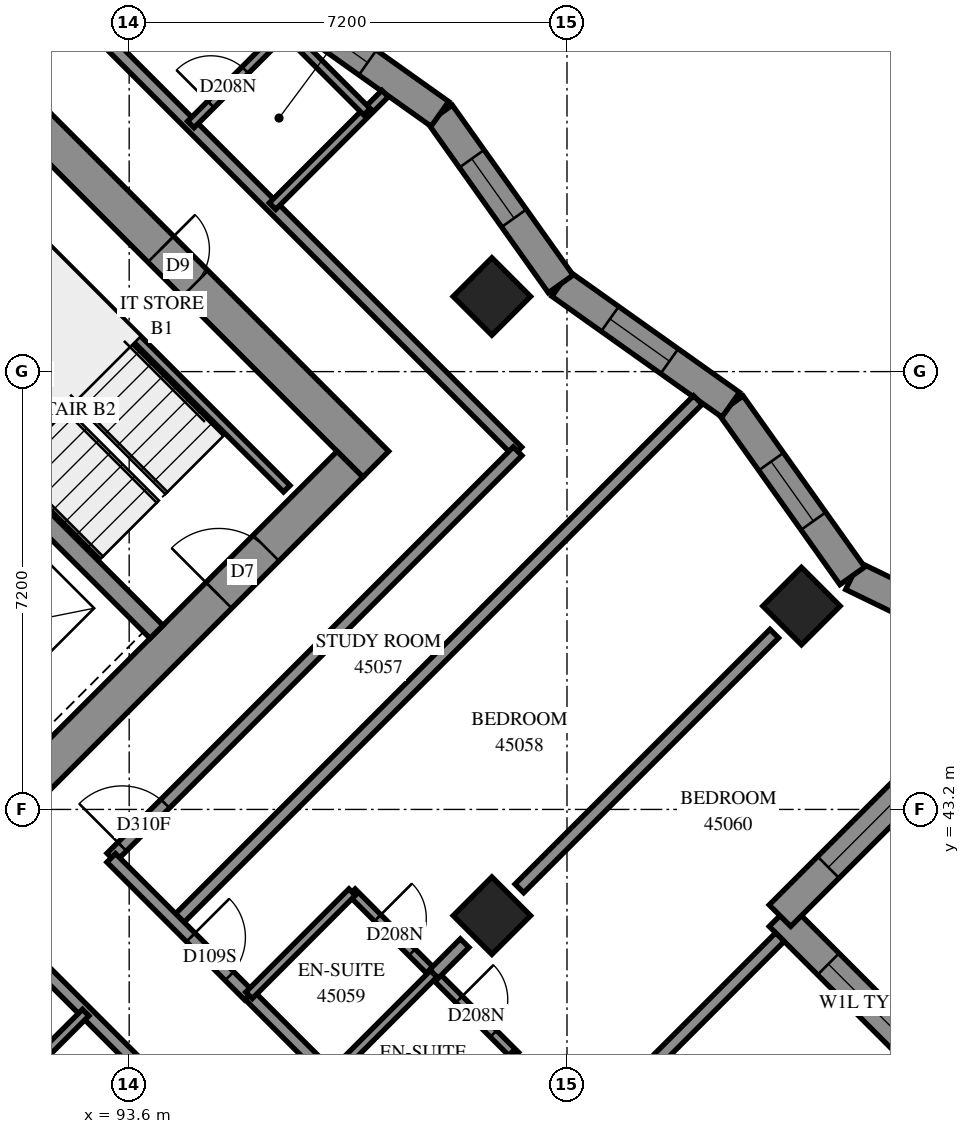
"""IFC4 building model, lengths in metres.
Left out: names, types, materials, properties, quantities, classifications, styles, units other than length and angle.
Written with IfcOpenShell. Run it as: python <this file> out.ifc"""

import sys

from ifc_helpers import new_model, si_unit, direction, frame, frame_2d, origin, origin_2d, place, context, subcontext, project, spatial, polyline, rectangle, outline, extrude, element, fill, save


model = new_model("IFC4")
c1 = context("Model", 3, precision=1e-05, world=origin(), true_north=direction((0.0, 1.0)))
c2 = subcontext(c1, "Body", "Model", "MODEL_VIEW")
j1 = project(units=[si_unit("LENGTHUNIT", "METRE"), si_unit("PLANEANGLEUNIT", "RADIAN")], contexts=[c1])
p1 = place(None, origin())
s1 = spatial("IfcSite", under=j1, at=p1, CompositionType="ELEMENT")
p2 = place(p1, origin())
s2 = spatial("IfcBuilding", under=s1, at=p2, CompositionType="ELEMENT")
p3 = place(p2, frame((0.0, 0.0, 166.0)))
s3 = spatial("IfcBuildingStorey", under=s2, at=p3, CompositionType="ELEMENT", Elevation=166.0)
for number, where, z_axis, x_axis in (
    (1, (99.565, 51.635, 0.0), (0.0, 0.0, 1.0), (0.707, -0.707, 0.0)),
    (2, (104.656, 46.544, 0.0), (0.0, 0.0, 1.0), (0.707, -0.707, 0.0)),
    (3, (99.565, 41.453, 0.0), (0.0, 0.0, 1.0), (0.707, -0.707, 0.0)),
):
    element("IfcColumn", number, at=place(p3, frame(where, z_axis=z_axis, x_axis=x_axis)), inside=s3, PredefinedType="COLUMN", context=c2, shape_type="SweptSolid", body=[
        extrude(rectangle(XDim=0.9, YDim=0.9, at=origin_2d()), origin(), (0.0, 0.0, 1.0), 3.1),
    ])
p4 = place(p3, frame((86.625, 59.908, -0.3), z_axis=(0.0, 0.0, 1.0), x_axis=(0.7071067812, -0.7071067812, 0.0)))
e4 = element("IfcWall", 4, at=p4, inside=s3, PredefinedType="SHEAR", context=c2, shape_type="SweptSolid", body=[
    extrude(rectangle(XDim=15.6, YDim=0.6, at=frame_2d((7.8, 0.0))), origin(), (0.0, 0.0, 1.0), 2.7),
])
p5 = place(p4, frame((10.6, 0.0, 0.3)))
e5 = element("IfcOpeningElement", 5, at=p5, cuts=e4, PredefinedType="OPENING", context=c2, shape_type="SweptSolid", body=[
    extrude(rectangle(XDim=0.8, YDim=2.1, at=frame_2d((0.4, 1.05))), frame((0.0, 0.31, 0.0), z_axis=(0.0, -1.0, 0.0), x_axis=(1.0, 0.0, 0.0)), (0.0, 0.0, 1.0), 0.62),
])
p6 = place(p3, frame((87.049, 38.695, -0.3), z_axis=(0.0, 0.0, 1.0), x_axis=(0.7071067812, 0.7071067812, 0.0)))
e6 = element("IfcWall", 6, at=p6, inside=s3, PredefinedType="SHEAR", context=c2, shape_type="SweptSolid", body=[
    extrude(rectangle(XDim=14.4, YDim=0.6, at=frame_2d((7.2, 0.0))), origin(), (0.0, 0.0, 1.0), 2.7),
])
p7 = place(p6, frame((4.55, 0.0, 0.3)))
e7 = element("IfcOpeningElement", 7, at=p7, cuts=e6, PredefinedType="OPENING", context=c2, shape_type="SweptSolid", body=[
    extrude(rectangle(XDim=1.1, YDim=2.1, at=frame_2d((0.55, 1.05))), frame((0.0, 0.31, 0.0), z_axis=(0.0, -1.0, 0.0), x_axis=(1.0, 0.0, 0.0)), (0.0, 0.0, 1.0), 0.62),
])
p8 = place(p6, frame((11.35, 0.0, 0.3)))
e8 = element("IfcOpeningElement", 8, at=p8, cuts=e6, PredefinedType="OPENING", context=c2, shape_type="SweptSolid", body=[
    extrude(rectangle(XDim=1.1, YDim=2.1, at=frame_2d((0.55, 1.05))), frame((0.0, 0.31, 0.0), z_axis=(0.0, -1.0, 0.0), x_axis=(1.0, 0.0, 0.0)), (0.0, 0.0, 1.0), 0.62),
])
p9 = place(p3, frame((88.958, 51.211, 0.0), z_axis=(0.0, 0.0, 1.0), x_axis=(0.7070998367, -0.7071137256, 0.0)))
e9 = element("IfcWall", 9, at=p9, inside=s3, PredefinedType="SOLIDWALL", context=c2, shape_type="SweptSolid", body=[
    extrude(rectangle(XDim=7.2, YDim=0.3, at=frame_2d((3.6, 0.0))), origin(), (0.0, 0.0, 1.0), 3.1),
])
p10 = place(p3, frame((107.761, 37.994, 0.0), z_axis=(0.0, 0.0, 1.0), x_axis=(-0.7071170028, 0.7070965594, 0.0)))
e10 = element("IfcWall", 10, at=p10, inside=s3, PredefinedType="SOLIDWALL", context=c2, shape_type="SweptSolid", body=[
    extrude(outline(polyline([(-0.159, -0.25), (4.641, -0.25), (5.141, 0.25), (0.159, 0.25), (-0.159, -0.25)])), origin(), (0.0, 0.0, 1.0), 3.1),
])
p11 = place(p10, frame((1.966, 0.0, 0.6)))
e11 = element("IfcOpeningElement", 11, at=p11, cuts=e10, PredefinedType="OPENING", context=c2, shape_type="SweptSolid", body=[
    extrude(rectangle(XDim=1.8, YDim=1.9, at=frame_2d((0.9, 0.95))), frame((0.0, 0.26, 0.0), z_axis=(0.0, -1.0, 0.0), x_axis=(1.0, 0.0, 0.0)), (0.0, 0.0, 1.0), 0.52),
])
p12 = place(p3, frame((104.302, 41.453, 0.0), z_axis=(0.0, 0.0, 1.0), x_axis=(0.7071238144, 0.7070897476, 0.0)))
e12 = element("IfcWall", 12, at=p12, inside=s3, PredefinedType="SOLIDWALL", context=c2, shape_type="SweptSolid", body=[
    extrude(outline(polyline([(0.25, -0.25), (6.222, -0.25), (5.52, 0.25), (-0.25, 0.25), (0.25, -0.25)])), origin(), (0.0, 0.0, 1.0), 3.1),
])
p13 = place(p12, frame((1.125, 0.0, 0.6)))
e13 = element("IfcOpeningElement", 13, at=p13, cuts=e12, PredefinedType="OPENING", context=c2, shape_type="SweptSolid", body=[
    extrude(rectangle(XDim=1.8, YDim=1.9, at=frame_2d((0.9, 0.95))), frame((0.0, 0.26, 0.0), z_axis=(0.0, -1.0, 0.0), x_axis=(1.0, 0.0, 0.0)), (0.0, 0.0, 1.0), 0.52),
])
p14 = place(p12, frame((3.985, 0.0, 0.6)))
e14 = element("IfcOpeningElement", 14, at=p14, cuts=e12, PredefinedType="OPENING", context=c2, shape_type="SweptSolid", body=[
    extrude(rectangle(XDim=1.2, YDim=1.9, at=frame_2d((0.6, 0.95))), frame((0.0, 0.26, 0.0), z_axis=(0.0, -1.0, 0.0), x_axis=(1.0, 0.0, 0.0)), (0.0, 0.0, 1.0), 0.52),
])
p15 = place(p3, frame((108.454, 45.604, 0.0), z_axis=(0.0, 0.0, 1.0), x_axis=(-0.8996561364, 0.4365991711, 0.0)))
e15 = element("IfcWall", 15, at=p15, inside=s3, PredefinedType="SOLIDWALL", context=c2, shape_type="SweptSolid", body=[
    extrude(outline(polyline([(-0.351, -0.25), (3.228, -0.25), (3.356, 0.25), (0.351, 0.25), (-0.351, -0.25)])), origin(), (0.0, 0.0, 1.0), 3.1),
])
p16 = place(p15, frame((1.222, 0.0, 0.45)))
e16 = element("IfcOpeningElement", 16, at=p16, cuts=e15, PredefinedType="OPENING", context=c2, shape_type="SweptSolid", body=[
    extrude(rectangle(XDim=1.2, YDim=2.5, at=frame_2d((0.6, 1.25))), frame((0.0, 0.26, 0.0), z_axis=(0.0, -1.0, 0.0), x_axis=(1.0, 0.0, 0.0)), (0.0, 0.0, 1.0), 0.52),
])
p17 = place(p3, frame((105.492, 47.041, 0.0), z_axis=(0.0, 0.0, 1.0), x_axis=(-0.5792714747, 0.8151346874, 0.0)))
e17 = element("IfcWall", 17, at=p17, inside=s3, PredefinedType="SOLIDWALL", context=c2, shape_type="SweptSolid", body=[
    extrude(outline(polyline([(0.064, -0.25), (3.494, -0.25), (3.409, 0.25), (-0.064, 0.25), (0.064, -0.25)])), origin(), (0.0, 0.0, 1.0), 3.1),
])
p18 = place(p17, frame((1.105, 0.0, 0.45)))
e18 = element("IfcOpeningElement", 18, at=p18, cuts=e17, PredefinedType="OPENING", context=c2, shape_type="SweptSolid", body=[
    extrude(rectangle(XDim=1.2, YDim=2.5, at=frame_2d((0.6, 1.25))), frame((0.0, 0.26, 0.0), z_axis=(0.0, -1.0, 0.0), x_axis=(1.0, 0.0, 0.0)), (0.0, 0.0, 1.0), 0.52),
])
p19 = place(p3, frame((103.493, 49.855, 0.0), z_axis=(0.0, 0.0, 1.0), x_axis=(-0.8151376585, 0.5792672938, 0.0)))
e19 = element("IfcWall", 19, at=p19, inside=s3, PredefinedType="SOLIDWALL", context=c2, shape_type="SweptSolid", body=[
    extrude(outline(polyline([(-0.042, -0.25), (3.388, -0.25), (3.472, 0.25), (0.042, 0.25), (-0.042, -0.25)])), origin(), (0.0, 0.0, 1.0), 3.1),
])
p20 = place(p19, frame((1.236, 0.0, 0.45)))
e20 = element("IfcOpeningElement", 20, at=p20, cuts=e19, PredefinedType="OPENING", context=c2, shape_type="SweptSolid", body=[
    extrude(rectangle(XDim=1.2, YDim=2.5, at=frame_2d((0.6, 1.25))), frame((0.0, 0.26, 0.0), z_axis=(0.0, -1.0, 0.0), x_axis=(1.0, 0.0, 0.0)), (0.0, 0.0, 1.0), 0.52),
])
p21 = place(p3, frame((100.697, 51.842, 0.0), z_axis=(0.0, 0.0, 1.0), x_axis=(-0.5792728992, 0.8151336751, 0.0)))
e21 = element("IfcWall", 21, at=p21, inside=s3, PredefinedType="SOLIDWALL", context=c2, shape_type="SweptSolid", body=[
    extrude(outline(polyline([(0.042, -0.25), (3.472, -0.25), (3.388, 0.25), (-0.042, 0.25), (0.042, -0.25)])), origin(), (0.0, 0.0, 1.0), 3.1),
])
p22 = place(p21, frame((1.326, 0.0, 0.45)))
e22 = element("IfcOpeningElement", 22, at=p22, cuts=e21, PredefinedType="OPENING", context=c2, shape_type="SweptSolid", body=[
    extrude(rectangle(XDim=1.2, YDim=2.5, at=frame_2d((0.6, 1.25))), frame((0.0, 0.26, 0.0), z_axis=(0.0, -1.0, 0.0), x_axis=(1.0, 0.0, 0.0)), (0.0, 0.0, 1.0), 0.52),
])
p23 = place(p3, frame((98.71, 54.638, 0.0), z_axis=(0.0, 0.0, 1.0), x_axis=(-0.8151376585, 0.5792672938, 0.0)))
e23 = element("IfcWall", 23, at=p23, inside=s3, PredefinedType="SOLIDWALL", context=c2, shape_type="SweptSolid", body=[
    extrude(outline(polyline([(-0.042, -0.25), (3.388, -0.25), (3.472, 0.25), (0.042, 0.25), (-0.042, -0.25)])), origin(), (0.0, 0.0, 1.0), 3.1),
])
p24 = place(p23, frame((1.457, 0.0, 0.45)))
e24 = element("IfcOpeningElement", 24, at=p24, cuts=e23, PredefinedType="OPENING", context=c2, shape_type="SweptSolid", body=[
    extrude(rectangle(XDim=1.2, YDim=2.5, at=frame_2d((0.6, 1.25))), frame((0.0, 0.26, 0.0), z_axis=(0.0, -1.0, 0.0), x_axis=(1.0, 0.0, 0.0)), (0.0, 0.0, 1.0), 0.52),
])
p25 = place(p3, frame((91.313, 53.354, 0.0), z_axis=(0.0, 0.0, 1.0), x_axis=(0.7071140275, -0.7070995348, 0.0)))
e25 = element("IfcWall", 25, at=p25, inside=s3, PredefinedType="PARTITIONING", context=c2, shape_type="SweptSolid", body=[
    extrude(rectangle(XDim=6.9, YDim=0.15, at=frame_2d((3.45, 0.0))), origin(), (0.0, 0.0, 1.0), 3.1),
])
p26 = place(p3, frame((91.967, 40.785, 0.0), z_axis=(0.0, 0.0, 1.0), x_axis=(0.7071067812, -0.7071067812, 0.0)))
e26 = element("IfcWall", 26, at=p26, inside=s3, PredefinedType="PARTITIONING", context=c2, shape_type="SweptSolid", body=[
    extrude(rectangle(XDim=12.1, YDim=0.2, at=frame_2d((6.05, 0.0))), origin(), (0.0, 0.0, 1.0), 3.1),
])
p27 = place(p26, frame((3.448, 0.0, 0.0)))
e27 = element("IfcOpeningElement", 27, at=p27, cuts=e26, PredefinedType="OPENING", context=c2, shape_type="SweptSolid", body=[
    extrude(rectangle(XDim=0.9, YDim=2.1, at=frame_2d((0.45, 1.05))), frame((0.0, 0.11, 0.0), z_axis=(0.0, -1.0, 0.0), x_axis=(1.0, 0.0, 0.0)), (0.0, 0.0, 1.0), 0.22),
])
p28 = place(p26, frame((8.457, 0.0, 0.0)))
e28 = element("IfcOpeningElement", 28, at=p28, cuts=e26, PredefinedType="OPENING", context=c2, shape_type="SweptSolid", body=[
    extrude(rectangle(XDim=1.0, YDim=2.1, at=frame_2d((0.5, 1.05))), frame((0.0, 0.11, 0.0), z_axis=(0.0, -1.0, 0.0), x_axis=(1.0, 0.0, 0.0)), (0.0, 0.0, 1.0), 0.22),
])
p29 = place(p3, frame((94.366, 41.348, 0.0), z_axis=(0.0, 0.0, 1.0), x_axis=(0.7071108994, 0.707102663, 0.0)))
e29 = element("IfcWall", 29, at=p29, inside=s3, PredefinedType="PARTITIONING", context=c2, shape_type="SweptSolid", body=[
    extrude(rectangle(XDim=12.141, YDim=0.2, at=frame_2d((6.071, 0.0))), origin(), (0.0, 0.0, 1.0), 3.1),
])
p30 = place(p3, frame((91.755, 57.317, 0.0), z_axis=(0.0, 0.0, 1.0), x_axis=(0.7071067812, -0.7071067812, 0.0)))
e30 = element("IfcWall", 30, at=p30, inside=s3, PredefinedType="PARTITIONING", context=c2, shape_type="SweptSolid", body=[
    extrude(rectangle(XDim=11.639, YDim=0.2, at=frame_2d((5.819, 0.0))), origin(), (0.0, 0.0, 1.0), 3.1),
])
p31 = place(p3, frame((93.306, 42.408, 0.0), z_axis=(0.0, 0.0, 1.0), x_axis=(0.7071067812, 0.7071067812, 0.0)))
e31 = element("IfcWall", 31, at=p31, inside=s3, PredefinedType="PARTITIONING", context=c2, shape_type="SweptSolid", body=[
    extrude(rectangle(XDim=9.45, YDim=0.2, at=frame_2d((4.725, 0.0))), origin(), (0.0, 0.0, 1.0), 3.1),
])
p32 = place(p31, frame((0.253, 0.0, 0.0)))
e32 = element("IfcOpeningElement", 32, at=p32, cuts=e31, PredefinedType="OPENING", context=c2, shape_type="SweptSolid", body=[
    extrude(rectangle(XDim=1.0, YDim=2.1, at=frame_2d((0.5, 1.05))), frame((0.0, 0.11, 0.0), z_axis=(0.0, -1.0, 0.0), x_axis=(1.0, 0.0, 0.0)), (0.0, 0.0, 1.0), 0.22),
])
p33 = place(p3, frame((99.458, 36.256, 0.0), z_axis=(0.0, 0.0, 1.0), x_axis=(0.7071067812, 0.7071067812, 0.0)))
e33 = element("IfcWall", 33, at=p33, inside=s3, PredefinedType="PARTITIONING", context=c2, shape_type="SweptSolid", body=[
    extrude(rectangle(XDim=6.85, YDim=0.2, at=frame_2d((3.425, 0.0))), origin(), (0.0, 0.0, 1.0), 3.1),
])
p34 = place(p3, frame((100.017, 41.901, 0.0), z_axis=(0.0, 0.0, 1.0), x_axis=(0.7072754814, 0.7069380408, 0.0)))
e34 = element("IfcWall", 34, at=p34, inside=s3, PredefinedType="PARTITIONING", context=c2, shape_type="SweptSolid", body=[
    extrude(rectangle(XDim=5.927, YDim=0.2, at=frame_2d((2.963, 0.0))), origin(), (0.0, 0.0, 1.0), 3.1),
])
p35 = place(p3, frame((97.263, 41.839, 0.0), z_axis=(0.0, 0.0, 1.0), x_axis=(0.7071067812, -0.7071067812, 0.0)))
e35 = element("IfcWall", 35, at=p35, inside=s3, PredefinedType="PARTITIONING", context=c2, shape_type="SweptSolid", body=[
    extrude(rectangle(XDim=3.801, YDim=0.15, at=frame_2d((1.901, 0.0))), origin(), (0.0, 0.0, 1.0), 3.1),
])
p36 = place(p35, frame((0.598, 0.0, 0.0)))
e36 = element("IfcOpeningElement", 36, at=p36, cuts=e35, PredefinedType="OPENING", context=c2, shape_type="SweptSolid", body=[
    extrude(rectangle(XDim=0.8, YDim=2.1, at=frame_2d((0.4, 1.05))), frame((0.0, 0.085, 0.0), z_axis=(0.0, -1.0, 0.0), x_axis=(1.0, 0.0, 0.0)), (0.0, 0.0, 1.0), 0.17),
])
p37 = place(p35, frame((2.493, 0.0, 0.0)))
e37 = element("IfcOpeningElement", 37, at=p37, cuts=e35, PredefinedType="OPENING", context=c2, shape_type="SweptSolid", body=[
    extrude(rectangle(XDim=0.8, YDim=2.1, at=frame_2d((0.4, 1.05))), frame((0.0, 0.085, 0.0), z_axis=(0.0, -1.0, 0.0), x_axis=(1.0, 0.0, 0.0)), (0.0, 0.0, 1.0), 0.17),
])
p38 = place(p3, frame((95.573, 40.148, 0.0), z_axis=(0.0, 0.0, 1.0), x_axis=(0.7068698107, -0.7073436723, 0.0)))
e38 = element("IfcWall", 38, at=p38, inside=s3, PredefinedType="PARTITIONING", context=c2, shape_type="SweptSolid", body=[
    extrude(rectangle(XDim=3.799, YDim=0.2, at=frame_2d((1.899, 0.0))), origin(), (0.0, 0.0, 1.0), 3.1),
])
p39 = place(p3, frame((93.305, 42.403, 0.0), z_axis=(0.0, 0.0, 1.0), x_axis=(0.7071067812, -0.7071067812, 0.0)))
e39 = element("IfcWall", 39, at=p39, inside=s3, PredefinedType="PARTITIONING", context=c2, shape_type="SweptSolid", body=[
    extrude(rectangle(XDim=3.199, YDim=0.2, at=frame_2d((1.599, 0.0))), origin(), (0.0, 0.0, 1.0), 3.1),
])
p40 = place(p39, frame((1.848, 0.0, 0.0)))
e40 = element("IfcOpeningElement", 40, at=p40, cuts=e39, PredefinedType="OPENING", context=c2, shape_type="SweptSolid", body=[
    extrude(rectangle(XDim=0.9, YDim=2.1, at=frame_2d((0.45, 1.05))), frame((0.0, 0.11, 0.0), z_axis=(0.0, -1.0, 0.0), x_axis=(1.0, 0.0, 0.0)), (0.0, 0.0, 1.0), 0.22),
])
p41 = place(p3, frame((95.957, 53.121, 0.0), z_axis=(0.0, 0.0, 1.0), x_axis=(0.7070876797, 0.7071258821, 0.0)))
e41 = element("IfcWall", 41, at=p41, inside=s3, PredefinedType="PARTITIONING", context=c2, shape_type="SweptSolid", body=[
    extrude(rectangle(XDim=2.618, YDim=0.15, at=frame_2d((1.309, 0.0))), origin(), (0.0, 0.0, 1.0), 3.1),
])
p42 = place(p3, frame((95.782, 56.401, 0.0), z_axis=(0.0, 0.0, 1.0), x_axis=(0.707127237, -0.7070863248, 0.0)))
e42 = element("IfcWall", 42, at=p42, inside=s3, PredefinedType="PARTITIONING", context=c2, shape_type="SweptSolid", body=[
    extrude(rectangle(XDim=2.444, YDim=0.15, at=frame_2d((1.222, 0.0))), origin(), (0.0, 0.0, 1.0), 3.1),
])
for number, where, z_axis, x_axis in (
    (43, (95.571, 40.143, 0.0), (0.0, 0.0, 1.0), (0.707, 0.708, 0.0)),
    (44, (98.253, 37.461, 0.0), (0.0, 0.0, 1.0), (0.708, 0.707, 0.0)),
    (45, (91.189, 38.161, 0.0), (0.0, 0.0, 1.0), (0.707, 0.708, 0.0)),
):
    element("IfcWall", number, at=place(p3, frame(where, z_axis=z_axis, x_axis=x_axis)), inside=s3, PredefinedType="PARTITIONING", context=c2, shape_type="SweptSolid", body=[
        extrude(rectangle(XDim=2.4, YDim=0.15, at=frame_2d((1.2, 0.0))), origin(), (0.0, 0.0, 1.0), 3.1),
    ])
p43 = place(p3, frame((96.913, 38.803, 0.0), z_axis=(0.0, 0.0, 1.0), x_axis=(0.7071067812, 0.7071067812, 0.0)))
e46 = element("IfcWall", 46, at=p43, inside=s3, PredefinedType="PARTITIONING", context=c2, shape_type="SweptSolid", body=[
    extrude(rectangle(XDim=2.398, YDim=0.15, at=frame_2d((1.199, 0.0))), origin(), (0.0, 0.0, 1.0), 3.1),
])
p44 = place(p3, frame((94.614, 54.464, 0.0), z_axis=(0.0, 0.0, 1.0), x_axis=(0.7071067812, 0.7071067812, 0.0)))
e47 = element("IfcWall", 47, at=p44, inside=s3, PredefinedType="PARTITIONING", context=c2, shape_type="SweptSolid", body=[
    extrude(rectangle(XDim=2.296, YDim=0.15, at=frame_2d((1.148, 0.0))), origin(), (0.0, 0.0, 1.0), 3.1),
])
p45 = place(p44, frame((0.466, 0.0, 0.0)))
e48 = element("IfcOpeningElement", 48, at=p45, cuts=e47, PredefinedType="OPENING", context=c2, shape_type="SweptSolid", body=[
    extrude(rectangle(XDim=0.8, YDim=2.1, at=frame_2d((0.4, 1.05))), frame((0.0, 0.085, 0.0), z_axis=(0.0, -1.0, 0.0), x_axis=(1.0, 0.0, 0.0)), (0.0, 0.0, 1.0), 0.17),
])
p46 = place(p3, frame((98.613, 40.495, 0.0), z_axis=(0.0, 0.0, 1.0), x_axis=(0.7057051861, 0.7085056035, 0.0)))
e49 = element("IfcWall", 49, at=p46, inside=s3, PredefinedType="PARTITIONING", context=c2, shape_type="SweptSolid", body=[
    extrude(rectangle(XDim=0.714, YDim=0.2, at=frame_2d((0.357, 0.0))), origin(), (0.0, 0.0, 1.0), 3.1),
])
p47 = place(p11, origin())
e50 = element("IfcWindow", 50, at=p47, inside=s3, PartitioningType="SINGLE_PANEL", PredefinedType="WINDOW", context=c2, shape_type="SweptSolid", body=[
    extrude(rectangle(XDim=1.8, YDim=1.9, at=frame_2d((0.9, 0.95))), frame((0.0, 0.18, 0.0), z_axis=(0.0, -1.0, 0.0), x_axis=(1.0, 0.0, 0.0)), (0.0, 0.0, 1.0), 0.06),
])
fill(e11, e50)
p48 = place(p13, origin())
e51 = element("IfcWindow", 51, at=p48, inside=s3, PartitioningType="SINGLE_PANEL", PredefinedType="WINDOW", context=c2, shape_type="SweptSolid", body=[
    extrude(rectangle(XDim=1.8, YDim=1.9, at=frame_2d((0.9, 0.95))), frame((0.0, 0.18, 0.0), z_axis=(0.0, -1.0, 0.0), x_axis=(1.0, 0.0, 0.0)), (0.0, 0.0, 1.0), 0.06),
])
fill(e13, e51)
p49 = place(p18, origin())
e52 = element("IfcWindow", 52, at=p49, inside=s3, PartitioningType="SINGLE_PANEL", PredefinedType="WINDOW", context=c2, shape_type="SweptSolid", body=[
    extrude(rectangle(XDim=1.2, YDim=2.5, at=frame_2d((0.6, 1.25))), frame((0.0, 0.18, 0.0), z_axis=(0.0, -1.0, 0.0), x_axis=(1.0, 0.0, 0.0)), (0.0, 0.0, 1.0), 0.06),
])
fill(e18, e52)
p50 = place(p20, origin())
e53 = element("IfcWindow", 53, at=p50, inside=s3, PartitioningType="SINGLE_PANEL", PredefinedType="WINDOW", context=c2, shape_type="SweptSolid", body=[
    extrude(rectangle(XDim=1.2, YDim=2.5, at=frame_2d((0.6, 1.25))), frame((0.0, 0.18, 0.0), z_axis=(0.0, -1.0, 0.0), x_axis=(1.0, 0.0, 0.0)), (0.0, 0.0, 1.0), 0.06),
])
fill(e20, e53)
p51 = place(p22, origin())
e54 = element("IfcWindow", 54, at=p51, inside=s3, PartitioningType="SINGLE_PANEL", PredefinedType="WINDOW", context=c2, shape_type="SweptSolid", body=[
    extrude(rectangle(XDim=1.2, YDim=2.5, at=frame_2d((0.6, 1.25))), frame((0.0, 0.18, 0.0), z_axis=(0.0, -1.0, 0.0), x_axis=(1.0, 0.0, 0.0)), (0.0, 0.0, 1.0), 0.06),
])
fill(e22, e54)
p52 = place(p24, origin())
e55 = element("IfcWindow", 55, at=p52, inside=s3, PartitioningType="SINGLE_PANEL", PredefinedType="WINDOW", context=c2, shape_type="SweptSolid", body=[
    extrude(rectangle(XDim=1.2, YDim=2.5, at=frame_2d((0.6, 1.25))), frame((0.0, 0.18, 0.0), z_axis=(0.0, -1.0, 0.0), x_axis=(1.0, 0.0, 0.0)), (0.0, 0.0, 1.0), 0.06),
])
fill(e24, e55)
p53 = place(p5, origin())
e56 = element("IfcDoor", 56, at=p53, inside=s3, OperationType="SINGLE_SWING_RIGHT", PredefinedType="DOOR", context=c2, shape_type="SweptSolid", body=[
    extrude(rectangle(XDim=0.8, YDim=2.1, at=frame_2d((0.4, 1.05))), frame((0.0, 0.025, 0.0), z_axis=(0.0, -1.0, 0.0), x_axis=(1.0, 0.0, 0.0)), (0.0, 0.0, 1.0), 0.05),
])
fill(e5, e56)
p54 = place(p8, origin())
e57 = element("IfcDoor", 57, at=p54, inside=s3, OperationType="SINGLE_SWING_RIGHT", PredefinedType="DOOR", context=c2, shape_type="SweptSolid", body=[
    extrude(rectangle(XDim=1.1, YDim=2.1, at=frame_2d((0.55, 1.05))), frame((0.0, 0.025, 0.0), z_axis=(0.0, -1.0, 0.0), x_axis=(1.0, 0.0, 0.0)), (0.0, 0.0, 1.0), 0.05),
])
fill(e8, e57)
p55 = place(p32, origin())
e58 = element("IfcDoor", 58, at=p55, inside=s3, OperationType="SINGLE_SWING_RIGHT", PredefinedType="DOOR", context=c2, shape_type="SweptSolid", body=[
    extrude(rectangle(XDim=1.0, YDim=2.1, at=frame_2d((0.5, 1.05))), frame((0.0, 0.025, 0.0), z_axis=(0.0, -1.0, 0.0), x_axis=(1.0, 0.0, 0.0)), (0.0, 0.0, 1.0), 0.05),
])
fill(e32, e58)
p56 = place(p40, origin())
e59 = element("IfcDoor", 59, at=p56, inside=s3, OperationType="SINGLE_SWING_RIGHT", PredefinedType="DOOR", context=c2, shape_type="SweptSolid", body=[
    extrude(rectangle(XDim=0.9, YDim=2.1, at=frame_2d((0.45, 1.05))), frame((0.0, 0.025, 0.0), z_axis=(0.0, -1.0, 0.0), x_axis=(1.0, 0.0, 0.0)), (0.0, 0.0, 1.0), 0.05),
])
fill(e40, e59)
p57 = place(p36, origin())
e60 = element("IfcDoor", 60, at=p57, inside=s3, OperationType="SINGLE_SWING_RIGHT", PredefinedType="DOOR", context=c2, shape_type="SweptSolid", body=[
    extrude(rectangle(XDim=0.8, YDim=2.1, at=frame_2d((0.4, 1.05))), frame((0.0, 0.025, 0.0), z_axis=(0.0, -1.0, 0.0), x_axis=(1.0, 0.0, 0.0)), (0.0, 0.0, 1.0), 0.05),
])
fill(e36, e60)
p58 = place(p37, origin())
e61 = element("IfcDoor", 61, at=p58, inside=s3, OperationType="SINGLE_SWING_RIGHT", PredefinedType="DOOR", context=c2, shape_type="SweptSolid", body=[
    extrude(rectangle(XDim=0.8, YDim=2.1, at=frame_2d((0.4, 1.05))), frame((0.0, 0.025, 0.0), z_axis=(0.0, -1.0, 0.0), x_axis=(1.0, 0.0, 0.0)), (0.0, 0.0, 1.0), 0.05),
])
fill(e37, e61)
p59 = place(p45, origin())
e62 = element("IfcDoor", 62, at=p59, inside=s3, OperationType="SINGLE_SWING_RIGHT", PredefinedType="DOOR", context=c2, shape_type="SweptSolid", body=[
    extrude(rectangle(XDim=0.8, YDim=2.1, at=frame_2d((0.4, 1.05))), frame((0.0, 0.025, 0.0), z_axis=(0.0, -1.0, 0.0), x_axis=(1.0, 0.0, 0.0)), (0.0, 0.0, 1.0), 0.05),
])
fill(e48, e62)
save(model, sys.argv[1])
